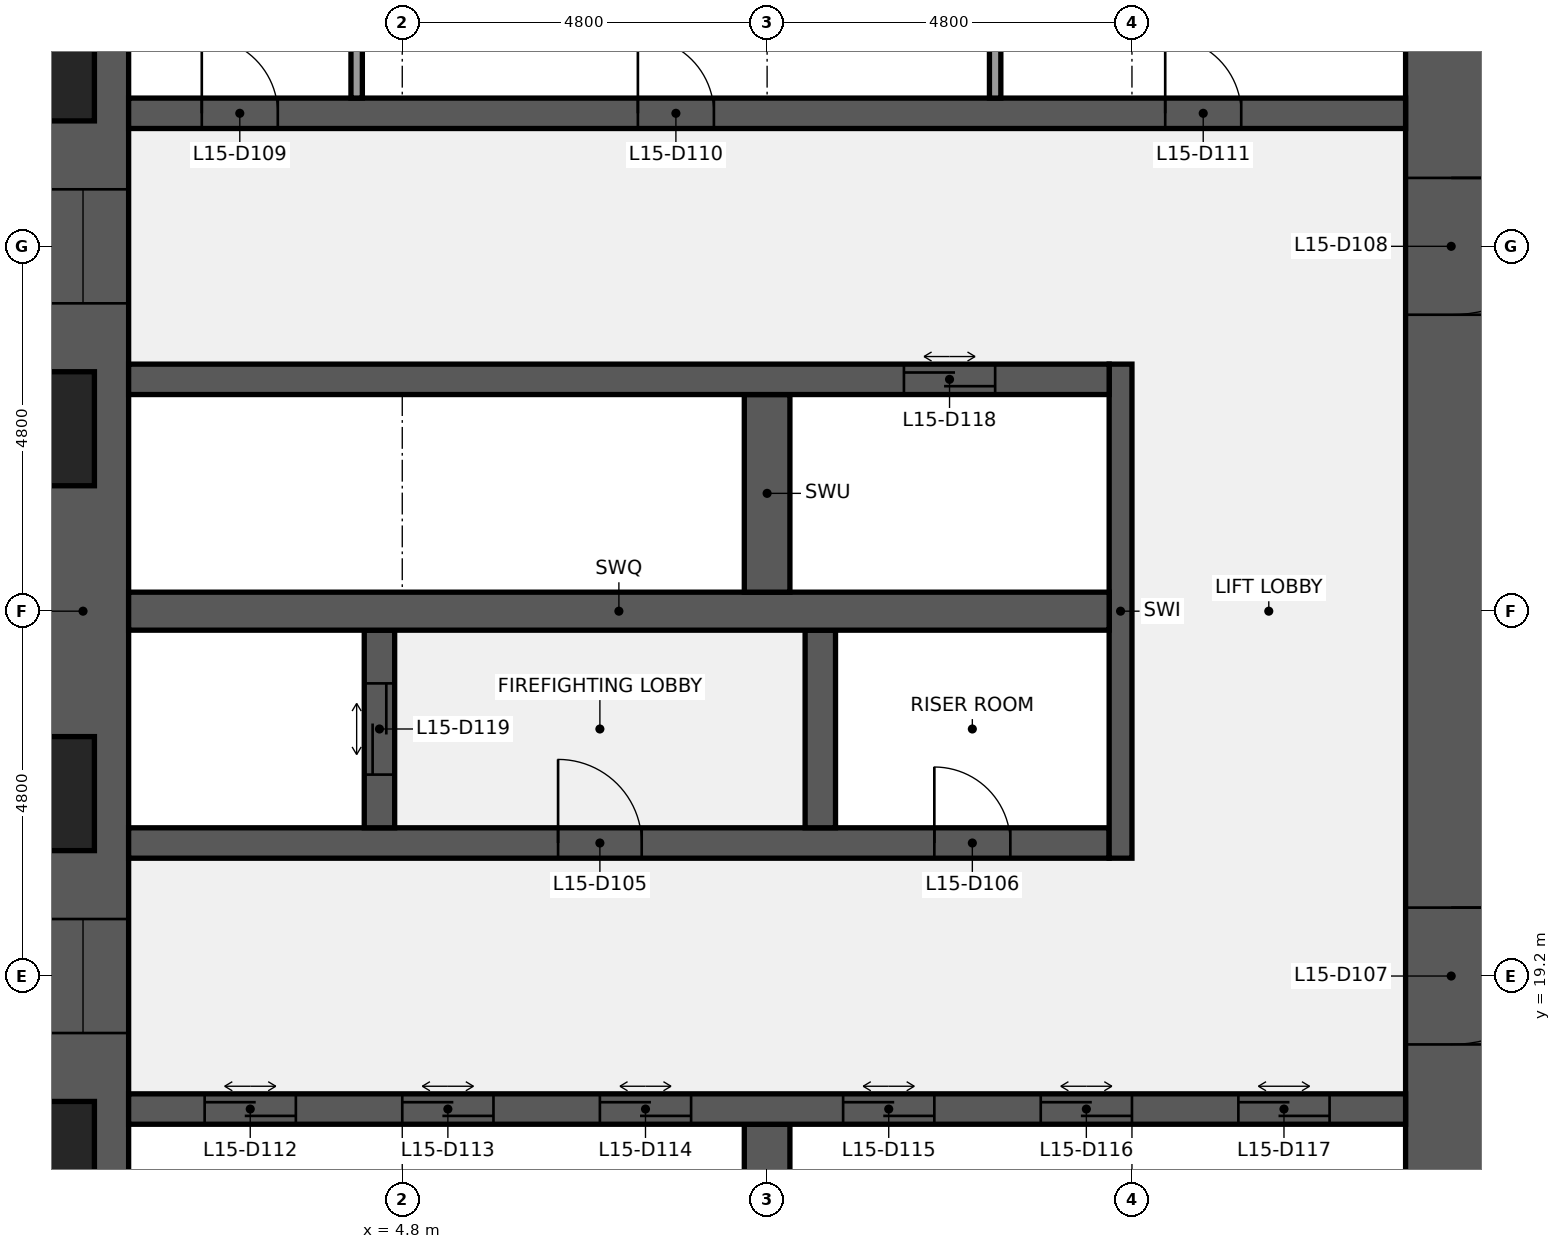
"""IFC4 building model, lengths in metres.
Left out: names, types, materials, properties, quantities, classifications, styles, units other than length and angle.
Written with IfcOpenShell. Run it as: python <this file> out.ifc"""

import sys

from ifc_helpers import new_model, si_unit, direction, frame, frame_2d, origin, place, context, subcontext, project, spatial, rectangle, extrude, element, fill, save


model = new_model("IFC4")
c1 = context("Model", 3, precision=1e-05, world=origin(), true_north=direction((0.0, 1.0)))
c2 = subcontext(c1, "Body", "Model", "MODEL_VIEW")
j1 = project(units=[si_unit("LENGTHUNIT", "METRE"), si_unit("PLANEANGLEUNIT", "RADIAN")], contexts=[c1])
p1 = place(None, origin())
s1 = spatial("IfcSite", under=j1, at=p1, CompositionType="ELEMENT")
p2 = place(p1, origin())
s2 = spatial("IfcBuilding", under=s1, at=p2, CompositionType="ELEMENT")
p3 = place(p2, frame((0.0, 0.0, 71.0)))
s3 = spatial("IfcBuildingStorey", under=s2, at=p3, CompositionType="ELEMENT", Elevation=71.0)
p4 = place(p3, frame((0.6, 9.6, 0.0), z_axis=(0.0, 0.0, 1.0), x_axis=(0.0, 1.0, 0.0)))
e1 = element("IfcWall", 1, at=p4, inside=s3, PredefinedType="SHEAR", context=c2, shape_type="SweptSolid", body=[
    extrude(rectangle(XDim=28.8, YDim=1.2, at=frame_2d((14.4, 0.0))), origin(), (0.0, 0.0, 1.0), 3.84),
])
p5 = place(p4, frame((8.85, 0.0, 0.9)))
e2 = element("IfcOpeningElement", 2, at=p5, cuts=e1, PredefinedType="OPENING", context=c2, shape_type="SweptSolid", body=[
    extrude(rectangle(XDim=1.5, YDim=1.5, at=frame_2d((0.75, 0.75))), frame((0.0, 0.61, 0.0), z_axis=(0.0, -1.0, 0.0), x_axis=(1.0, 0.0, 0.0)), (0.0, 0.0, 1.0), 1.22),
])
p6 = place(p4, frame((18.45, 0.0, 0.9)))
e3 = element("IfcOpeningElement", 3, at=p6, cuts=e1, PredefinedType="OPENING", context=c2, shape_type="SweptSolid", body=[
    extrude(rectangle(XDim=1.5, YDim=1.5, at=frame_2d((0.75, 0.75))), frame((0.0, 0.61, 0.0), z_axis=(0.0, -1.0, 0.0), x_axis=(1.0, 0.0, 0.0)), (0.0, 0.0, 1.0), 1.22),
])
p7 = place(p3, frame((18.6, 38.4, 0.0), z_axis=(0.0, 0.0, 1.0), x_axis=(0.0, -1.0, 0.0)))
e4 = element("IfcWall", 4, at=p7, inside=s3, PredefinedType="SHEAR", context=c2, shape_type="SweptSolid", body=[
    extrude(rectangle(XDim=28.8, YDim=1.2, at=frame_2d((14.4, 0.0))), origin(), (0.0, 0.0, 1.0), 3.84),
])
p8 = place(p7, frame((18.3, 0.0, 0.0)))
e5 = element("IfcOpeningElement", 5, at=p8, cuts=e4, PredefinedType="OPENING", context=c2, shape_type="SweptSolid", body=[
    extrude(rectangle(XDim=1.8, YDim=2.1, at=frame_2d((0.9, 1.05))), frame((0.0, 0.61, 0.0), z_axis=(0.0, -1.0, 0.0), x_axis=(1.0, 0.0, 0.0)), (0.0, 0.0, 1.0), 1.22),
])
p9 = place(p7, frame((8.7, 0.0, 0.0)))
e6 = element("IfcOpeningElement", 6, at=p9, cuts=e4, PredefinedType="OPENING", context=c2, shape_type="SweptSolid", body=[
    extrude(rectangle(XDim=1.8, YDim=2.1, at=frame_2d((0.9, 1.05))), frame((0.0, 0.61, 0.0), z_axis=(0.0, -1.0, 0.0), x_axis=(1.0, 0.0, 0.0)), (0.0, 0.0, 1.0), 1.22),
])
p10 = place(p3, frame((9.6, 14.65, 0.0), z_axis=(0.0, 0.0, 1.0), x_axis=(0.0, 1.0, 0.0)))
e7 = element("IfcWall", 7, at=p10, inside=s3, PredefinedType="SHEAR", context=c2, shape_type="SweptSolid", body=[
    extrude(rectangle(XDim=2.6, YDim=0.6, at=frame_2d((1.3, 0.0))), origin(), (0.0, 0.0, 1.0), 3.84),
])
p11 = place(p3, frame((1.2, 17.45, 0.0), z_axis=(0.0, 0.0, 1.0), x_axis=(1.0, 0.0, 0.0)))
e8 = element("IfcWall", 8, at=p11, inside=s3, PredefinedType="SHEAR", context=c2, shape_type="SweptSolid", body=[
    extrude(rectangle(XDim=16.8, YDim=0.4, at=frame_2d((8.4, 0.0))), origin(), (0.0, 0.0, 1.0), 3.84),
])
p12 = place(p11, frame((1.0, 0.0, 0.0)))
e9 = element("IfcOpeningElement", 9, at=p12, cuts=e8, PredefinedType="OPENING", context=c2, shape_type="SweptSolid", body=[
    extrude(rectangle(XDim=1.2, YDim=2.1, at=frame_2d((0.6, 1.05))), frame((0.0, 0.21, 0.0), z_axis=(0.0, -1.0, 0.0), x_axis=(1.0, 0.0, 0.0)), (0.0, 0.0, 1.0), 0.42),
])
p13 = place(p11, frame((3.6, 0.0, 0.0)))
e10 = element("IfcOpeningElement", 10, at=p13, cuts=e8, PredefinedType="OPENING", context=c2, shape_type="SweptSolid", body=[
    extrude(rectangle(XDim=1.2, YDim=2.1, at=frame_2d((0.6, 1.05))), frame((0.0, 0.21, 0.0), z_axis=(0.0, -1.0, 0.0), x_axis=(1.0, 0.0, 0.0)), (0.0, 0.0, 1.0), 0.42),
])
p14 = place(p11, frame((6.2, 0.0, 0.0)))
e11 = element("IfcOpeningElement", 11, at=p14, cuts=e8, PredefinedType="OPENING", context=c2, shape_type="SweptSolid", body=[
    extrude(rectangle(XDim=1.2, YDim=2.1, at=frame_2d((0.6, 1.05))), frame((0.0, 0.21, 0.0), z_axis=(0.0, -1.0, 0.0), x_axis=(1.0, 0.0, 0.0)), (0.0, 0.0, 1.0), 0.42),
])
p15 = place(p11, frame((9.4, 0.0, 0.0)))
e12 = element("IfcOpeningElement", 12, at=p15, cuts=e8, PredefinedType="OPENING", context=c2, shape_type="SweptSolid", body=[
    extrude(rectangle(XDim=1.2, YDim=2.1, at=frame_2d((0.6, 1.05))), frame((0.0, 0.21, 0.0), z_axis=(0.0, -1.0, 0.0), x_axis=(1.0, 0.0, 0.0)), (0.0, 0.0, 1.0), 0.42),
])
p16 = place(p11, frame((12.0, 0.0, 0.0)))
e13 = element("IfcOpeningElement", 13, at=p16, cuts=e8, PredefinedType="OPENING", context=c2, shape_type="SweptSolid", body=[
    extrude(rectangle(XDim=1.2, YDim=2.1, at=frame_2d((0.6, 1.05))), frame((0.0, 0.21, 0.0), z_axis=(0.0, -1.0, 0.0), x_axis=(1.0, 0.0, 0.0)), (0.0, 0.0, 1.0), 0.42),
])
p17 = place(p11, frame((14.6, 0.0, 0.0)))
e14 = element("IfcOpeningElement", 14, at=p17, cuts=e8, PredefinedType="OPENING", context=c2, shape_type="SweptSolid", body=[
    extrude(rectangle(XDim=1.2, YDim=2.1, at=frame_2d((0.6, 1.05))), frame((0.0, 0.21, 0.0), z_axis=(0.0, -1.0, 0.0), x_axis=(1.0, 0.0, 0.0)), (0.0, 0.0, 1.0), 0.42),
])
p18 = place(p3, frame((1.2, 20.95, 0.0), z_axis=(0.0, 0.0, 1.0), x_axis=(1.0, 0.0, 0.0)))
e15 = element("IfcWall", 15, at=p18, inside=s3, PredefinedType="SHEAR", context=c2, shape_type="SweptSolid", body=[
    extrude(rectangle(XDim=12.9, YDim=0.4, at=frame_2d((6.45, 0.0))), origin(), (0.0, 0.0, 1.0), 3.84),
])
p19 = place(p18, frame((5.65, 0.0, 0.0)))
e16 = element("IfcOpeningElement", 16, at=p19, cuts=e15, PredefinedType="OPENING", context=c2, shape_type="SweptSolid", body=[
    extrude(rectangle(XDim=1.1, YDim=2.1, at=frame_2d((0.55, 1.05))), frame((0.0, 0.21, 0.0), z_axis=(0.0, -1.0, 0.0), x_axis=(1.0, 0.0, 0.0)), (0.0, 0.0, 1.0), 0.42),
])
p20 = place(p18, frame((10.6, 0.0, 0.0)))
e17 = element("IfcOpeningElement", 17, at=p20, cuts=e15, PredefinedType="OPENING", context=c2, shape_type="SweptSolid", body=[
    extrude(rectangle(XDim=1.0, YDim=2.1, at=frame_2d((0.5, 1.05))), frame((0.0, 0.21, 0.0), z_axis=(0.0, -1.0, 0.0), x_axis=(1.0, 0.0, 0.0)), (0.0, 0.0, 1.0), 0.42),
])
p21 = place(p3, frame((14.25, 20.75, 0.0), z_axis=(0.0, 0.0, 1.0), x_axis=(0.0, 1.0, 0.0)))
e18 = element("IfcWall", 18, at=p21, inside=s3, PredefinedType="SHEAR", context=c2, shape_type="SweptSolid", body=[
    extrude(rectangle(XDim=6.5, YDim=0.3, at=frame_2d((3.25, 0.0))), origin(), (0.0, 0.0, 1.0), 3.84),
])
p22 = place(p3, frame((4.5, 21.15, 0.0), z_axis=(0.0, 0.0, 1.0), x_axis=(0.0, 1.0, 0.0)))
e19 = element("IfcWall", 19, at=p22, inside=s3, PredefinedType="SHEAR", context=c2, shape_type="SweptSolid", body=[
    extrude(rectangle(XDim=2.6, YDim=0.4, at=frame_2d((1.3, 0.0))), origin(), (0.0, 0.0, 1.0), 3.84),
])
p23 = place(p22, frame((0.7, 0.0, 0.0)))
e20 = element("IfcOpeningElement", 20, at=p23, cuts=e19, PredefinedType="OPENING", context=c2, shape_type="SweptSolid", body=[
    extrude(rectangle(XDim=1.2, YDim=2.1, at=frame_2d((0.6, 1.05))), frame((0.0, 0.21, 0.0), z_axis=(0.0, -1.0, 0.0), x_axis=(1.0, 0.0, 0.0)), (0.0, 0.0, 1.0), 0.42),
])
p24 = place(p3, frame((10.3, 21.15, 0.0), z_axis=(0.0, 0.0, 1.0), x_axis=(0.0, 1.0, 0.0)))
e21 = element("IfcWall", 21, at=p24, inside=s3, PredefinedType="SHEAR", context=c2, shape_type="SweptSolid", body=[
    extrude(rectangle(XDim=2.6, YDim=0.4, at=frame_2d((1.3, 0.0))), origin(), (0.0, 0.0, 1.0), 3.84),
])
p25 = place(p3, frame((1.2, 24.0, 0.0), z_axis=(0.0, 0.0, 1.0), x_axis=(1.0, 0.0, 0.0)))
e22 = element("IfcWall", 22, at=p25, inside=s3, PredefinedType="SHEAR", context=c2, shape_type="SweptSolid", body=[
    extrude(rectangle(XDim=12.9, YDim=0.5, at=frame_2d((6.45, 0.0))), origin(), (0.0, 0.0, 1.0), 3.84),
])
p26 = place(p3, frame((9.6, 24.25, 0.0), z_axis=(0.0, 0.0, 1.0), x_axis=(0.0, 1.0, 0.0)))
e23 = element("IfcWall", 23, at=p26, inside=s3, PredefinedType="SHEAR", context=c2, shape_type="SweptSolid", body=[
    extrude(rectangle(XDim=2.6, YDim=0.6, at=frame_2d((1.3, 0.0))), origin(), (0.0, 0.0, 1.0), 3.84),
])
p27 = place(p3, frame((1.2, 27.05, 0.0), z_axis=(0.0, 0.0, 1.0), x_axis=(1.0, 0.0, 0.0)))
e24 = element("IfcWall", 24, at=p27, inside=s3, PredefinedType="SHEAR", context=c2, shape_type="SweptSolid", body=[
    extrude(rectangle(XDim=12.9, YDim=0.4, at=frame_2d((6.45, 0.0))), origin(), (0.0, 0.0, 1.0), 3.84),
])
p28 = place(p27, frame((10.2, 0.0, 0.0)))
e25 = element("IfcOpeningElement", 25, at=p28, cuts=e24, PredefinedType="OPENING", context=c2, shape_type="SweptSolid", body=[
    extrude(rectangle(XDim=1.2, YDim=2.1, at=frame_2d((0.6, 1.05))), frame((0.0, 0.21, 0.0), z_axis=(0.0, -1.0, 0.0), x_axis=(1.0, 0.0, 0.0)), (0.0, 0.0, 1.0), 0.42),
])
p29 = place(p3, frame((1.2, 30.55, 0.0), z_axis=(0.0, 0.0, 1.0), x_axis=(1.0, 0.0, 0.0)))
e26 = element("IfcWall", 26, at=p29, inside=s3, PredefinedType="SHEAR", context=c2, shape_type="SweptSolid", body=[
    extrude(rectangle(XDim=16.8, YDim=0.4, at=frame_2d((8.4, 0.0))), origin(), (0.0, 0.0, 1.0), 3.84),
])
p30 = place(p29, frame((0.962, 0.0, 0.0)))
e27 = element("IfcOpeningElement", 27, at=p30, cuts=e26, PredefinedType="OPENING", context=c2, shape_type="SweptSolid", body=[
    extrude(rectangle(XDim=1.0, YDim=2.1, at=frame_2d((0.5, 1.05))), frame((0.0, 0.21, 0.0), z_axis=(0.0, -1.0, 0.0), x_axis=(1.0, 0.0, 0.0)), (0.0, 0.0, 1.0), 0.42),
])
p31 = place(p29, frame((6.7, 0.0, 0.0)))
e28 = element("IfcOpeningElement", 28, at=p31, cuts=e26, PredefinedType="OPENING", context=c2, shape_type="SweptSolid", body=[
    extrude(rectangle(XDim=1.0, YDim=2.1, at=frame_2d((0.5, 1.05))), frame((0.0, 0.21, 0.0), z_axis=(0.0, -1.0, 0.0), x_axis=(1.0, 0.0, 0.0)), (0.0, 0.0, 1.0), 0.42),
])
p32 = place(p29, frame((13.637, 0.0, 0.0)))
e29 = element("IfcOpeningElement", 29, at=p32, cuts=e26, PredefinedType="OPENING", context=c2, shape_type="SweptSolid", body=[
    extrude(rectangle(XDim=1.0, YDim=2.1, at=frame_2d((0.5, 1.05))), frame((0.0, 0.21, 0.0), z_axis=(0.0, -1.0, 0.0), x_axis=(1.0, 0.0, 0.0)), (0.0, 0.0, 1.0), 0.42),
])
for number, where, z_axis, x_axis in (
    (30, (4.2, 30.75, 0.0), (0.0, 0.0, 1.0), (0.0, 1.0, 0.0)),
    (31, (12.6, 30.75, 0.0), (0.0, 0.0, 1.0), (0.0, 1.0, 0.0)),
):
    element("IfcWall", number, at=place(p3, frame(where, z_axis=z_axis, x_axis=x_axis)), inside=s3, PredefinedType="PARTITIONING", context=c2, shape_type="SweptSolid", body=[
        extrude(rectangle(XDim=2.6, YDim=0.15, at=frame_2d((1.3, 0.0))), origin(), (0.0, 0.0, 1.0), 3.84),
    ])
p33 = place(p19, origin())
e32 = element("IfcDoor", 32, at=p33, inside=s3, OperationType="SINGLE_SWING_LEFT", PredefinedType="DOOR", context=c2, shape_type="SweptSolid", body=[
    extrude(rectangle(XDim=1.1, YDim=2.1, at=frame_2d((0.55, 1.05))), frame((0.0, 0.025, 0.0), z_axis=(0.0, -1.0, 0.0), x_axis=(1.0, 0.0, 0.0)), (0.0, 0.0, 1.0), 0.05),
])
fill(e16, e32)
p34 = place(p20, origin())
e33 = element("IfcDoor", 33, at=p34, inside=s3, OperationType="SINGLE_SWING_LEFT", PredefinedType="DOOR", context=c2, shape_type="SweptSolid", body=[
    extrude(rectangle(XDim=1.0, YDim=2.1, at=frame_2d((0.5, 1.05))), frame((0.0, 0.025, 0.0), z_axis=(0.0, -1.0, 0.0), x_axis=(1.0, 0.0, 0.0)), (0.0, 0.0, 1.0), 0.05),
])
fill(e17, e33)
p35 = place(p8, origin())
e34 = element("IfcDoor", 34, at=p35, inside=s3, OperationType="DOUBLE_DOOR_SINGLE_SWING", PredefinedType="DOOR", context=c2, shape_type="SweptSolid", body=[
    extrude(rectangle(XDim=1.8, YDim=2.1, at=frame_2d((0.9, 1.05))), frame((0.0, 0.025, 0.0), z_axis=(0.0, -1.0, 0.0), x_axis=(1.0, 0.0, 0.0)), (0.0, 0.0, 1.0), 0.05),
])
fill(e5, e34)
p36 = place(p9, origin())
e35 = element("IfcDoor", 35, at=p36, inside=s3, OperationType="DOUBLE_DOOR_SINGLE_SWING", PredefinedType="DOOR", context=c2, shape_type="SweptSolid", body=[
    extrude(rectangle(XDim=1.8, YDim=2.1, at=frame_2d((0.9, 1.05))), frame((0.0, 0.025, 0.0), z_axis=(0.0, -1.0, 0.0), x_axis=(1.0, 0.0, 0.0)), (0.0, 0.0, 1.0), 0.05),
])
fill(e6, e35)
p37 = place(p30, origin())
e36 = element("IfcDoor", 36, at=p37, inside=s3, OperationType="SINGLE_SWING_LEFT", PredefinedType="DOOR", context=c2, shape_type="SweptSolid", body=[
    extrude(rectangle(XDim=1.0, YDim=2.1, at=frame_2d((0.5, 1.05))), frame((0.0, 0.025, 0.0), z_axis=(0.0, -1.0, 0.0), x_axis=(1.0, 0.0, 0.0)), (0.0, 0.0, 1.0), 0.05),
])
fill(e27, e36)
p38 = place(p31, origin())
e37 = element("IfcDoor", 37, at=p38, inside=s3, OperationType="SINGLE_SWING_LEFT", PredefinedType="DOOR", context=c2, shape_type="SweptSolid", body=[
    extrude(rectangle(XDim=1.0, YDim=2.1, at=frame_2d((0.5, 1.05))), frame((0.0, 0.025, 0.0), z_axis=(0.0, -1.0, 0.0), x_axis=(1.0, 0.0, 0.0)), (0.0, 0.0, 1.0), 0.05),
])
fill(e28, e37)
p39 = place(p32, origin())
e38 = element("IfcDoor", 38, at=p39, inside=s3, OperationType="SINGLE_SWING_LEFT", PredefinedType="DOOR", context=c2, shape_type="SweptSolid", body=[
    extrude(rectangle(XDim=1.0, YDim=2.1, at=frame_2d((0.5, 1.05))), frame((0.0, 0.025, 0.0), z_axis=(0.0, -1.0, 0.0), x_axis=(1.0, 0.0, 0.0)), (0.0, 0.0, 1.0), 0.05),
])
fill(e29, e38)
p40 = place(p12, origin())
e39 = element("IfcDoor", 39, at=p40, inside=s3, OperationType="DOUBLE_DOOR_SLIDING", PredefinedType="DOOR", context=c2, shape_type="SweptSolid", body=[
    extrude(rectangle(XDim=1.2, YDim=2.1, at=frame_2d((0.6, 1.05))), frame((0.0, 0.025, 0.0), z_axis=(0.0, -1.0, 0.0), x_axis=(1.0, 0.0, 0.0)), (0.0, 0.0, 1.0), 0.05),
])
fill(e9, e39)
p41 = place(p13, origin())
e40 = element("IfcDoor", 40, at=p41, inside=s3, OperationType="DOUBLE_DOOR_SLIDING", PredefinedType="DOOR", context=c2, shape_type="SweptSolid", body=[
    extrude(rectangle(XDim=1.2, YDim=2.1, at=frame_2d((0.6, 1.05))), frame((0.0, 0.025, 0.0), z_axis=(0.0, -1.0, 0.0), x_axis=(1.0, 0.0, 0.0)), (0.0, 0.0, 1.0), 0.05),
])
fill(e10, e40)
p42 = place(p14, origin())
e41 = element("IfcDoor", 41, at=p42, inside=s3, OperationType="DOUBLE_DOOR_SLIDING", PredefinedType="DOOR", context=c2, shape_type="SweptSolid", body=[
    extrude(rectangle(XDim=1.2, YDim=2.1, at=frame_2d((0.6, 1.05))), frame((0.0, 0.025, 0.0), z_axis=(0.0, -1.0, 0.0), x_axis=(1.0, 0.0, 0.0)), (0.0, 0.0, 1.0), 0.05),
])
fill(e11, e41)
p43 = place(p15, origin())
e42 = element("IfcDoor", 42, at=p43, inside=s3, OperationType="DOUBLE_DOOR_SLIDING", PredefinedType="DOOR", context=c2, shape_type="SweptSolid", body=[
    extrude(rectangle(XDim=1.2, YDim=2.1, at=frame_2d((0.6, 1.05))), frame((0.0, 0.025, 0.0), z_axis=(0.0, -1.0, 0.0), x_axis=(1.0, 0.0, 0.0)), (0.0, 0.0, 1.0), 0.05),
])
fill(e12, e42)
p44 = place(p16, origin())
e43 = element("IfcDoor", 43, at=p44, inside=s3, OperationType="DOUBLE_DOOR_SLIDING", PredefinedType="DOOR", context=c2, shape_type="SweptSolid", body=[
    extrude(rectangle(XDim=1.2, YDim=2.1, at=frame_2d((0.6, 1.05))), frame((0.0, 0.025, 0.0), z_axis=(0.0, -1.0, 0.0), x_axis=(1.0, 0.0, 0.0)), (0.0, 0.0, 1.0), 0.05),
])
fill(e13, e43)
p45 = place(p17, origin())
e44 = element("IfcDoor", 44, at=p45, inside=s3, OperationType="DOUBLE_DOOR_SLIDING", PredefinedType="DOOR", context=c2, shape_type="SweptSolid", body=[
    extrude(rectangle(XDim=1.2, YDim=2.1, at=frame_2d((0.6, 1.05))), frame((0.0, 0.025, 0.0), z_axis=(0.0, -1.0, 0.0), x_axis=(1.0, 0.0, 0.0)), (0.0, 0.0, 1.0), 0.05),
])
fill(e14, e44)
p46 = place(p28, origin())
e45 = element("IfcDoor", 45, at=p46, inside=s3, OperationType="DOUBLE_DOOR_SLIDING", PredefinedType="DOOR", context=c2, shape_type="SweptSolid", body=[
    extrude(rectangle(XDim=1.2, YDim=2.1, at=frame_2d((0.6, 1.05))), frame((0.0, 0.025, 0.0), z_axis=(0.0, -1.0, 0.0), x_axis=(1.0, 0.0, 0.0)), (0.0, 0.0, 1.0), 0.05),
])
fill(e25, e45)
p47 = place(p23, origin())
e46 = element("IfcDoor", 46, at=p47, inside=s3, OperationType="DOUBLE_DOOR_SLIDING", PredefinedType="DOOR", context=c2, shape_type="SweptSolid", body=[
    extrude(rectangle(XDim=1.2, YDim=2.1, at=frame_2d((0.6, 1.05))), frame((0.0, 0.025, 0.0), z_axis=(0.0, -1.0, 0.0), x_axis=(1.0, 0.0, 0.0)), (0.0, 0.0, 1.0), 0.05),
])
fill(e20, e46)
p48 = place(p5, origin())
e47 = element("IfcWindow", 47, at=p48, inside=s3, PartitioningType="SINGLE_PANEL", PredefinedType="WINDOW", context=c2, shape_type="SweptSolid", body=[
    extrude(rectangle(XDim=1.5, YDim=1.5, at=frame_2d((0.75, 0.75))), frame((0.0, 0.03, 0.0), z_axis=(0.0, -1.0, 0.0), x_axis=(1.0, 0.0, 0.0)), (0.0, 0.0, 1.0), 0.06),
])
fill(e2, e47)
p49 = place(p6, origin())
e48 = element("IfcWindow", 48, at=p49, inside=s3, PartitioningType="SINGLE_PANEL", PredefinedType="WINDOW", context=c2, shape_type="SweptSolid", body=[
    extrude(rectangle(XDim=1.5, YDim=1.5, at=frame_2d((0.75, 0.75))), frame((0.0, 0.03, 0.0), z_axis=(0.0, -1.0, 0.0), x_axis=(1.0, 0.0, 0.0)), (0.0, 0.0, 1.0), 0.06),
])
fill(e3, e48)
save(model, sys.argv[1])
